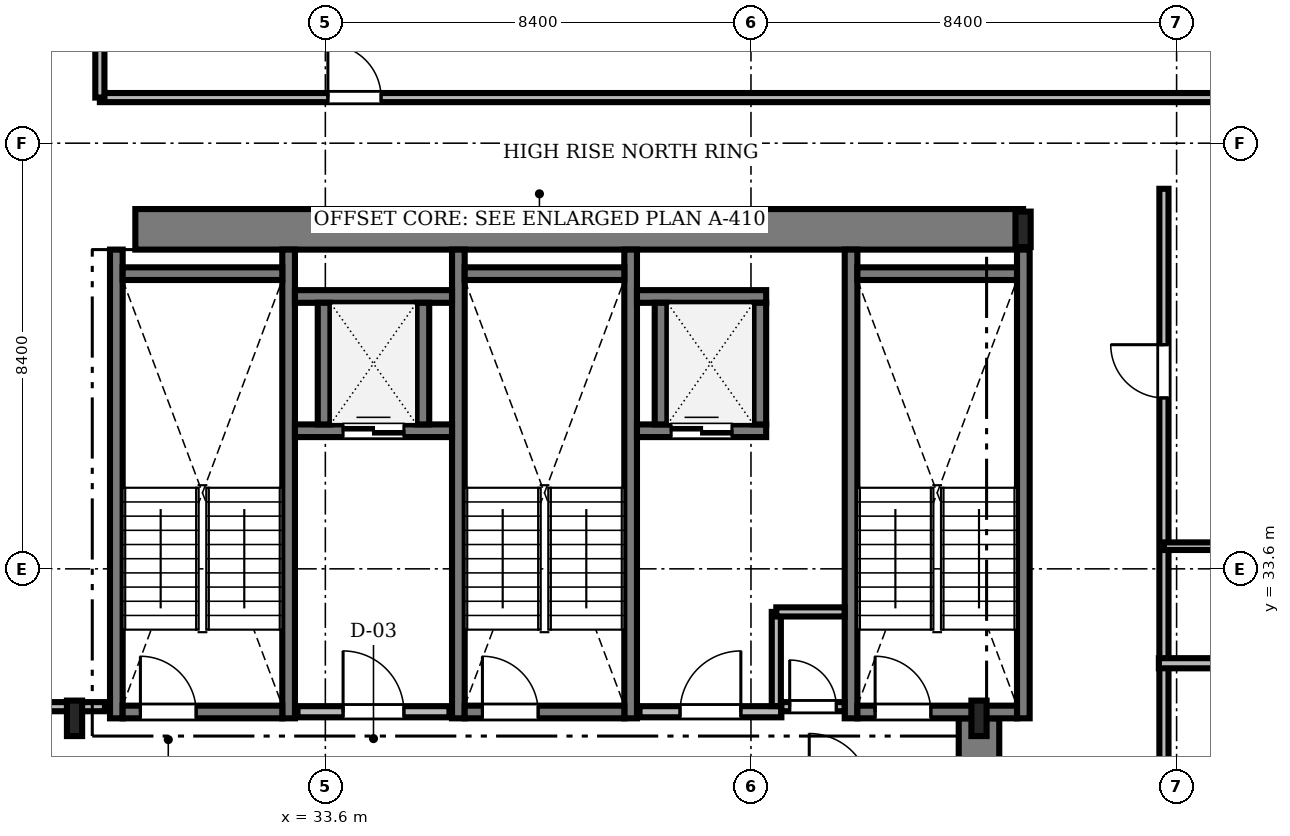
"""IFC4 building model, lengths in metres.
Left out: names, types, materials, properties, quantities, classifications, styles, units other than length and angle.
Written with IfcOpenShell. Run it as: python <this file> out.ifc"""

import sys

from ifc_helpers import new_model, si_unit, direction, frame, frame_2d, origin, origin_2d, place, context, subcontext, project, spatial, rectangle, i_section, extrude, source, transform, mapped, element, fill, save


model = new_model("IFC4")
c1 = context("Model", 3, precision=1e-05, world=origin(), true_north=direction((0.0, 1.0)))
c2 = subcontext(c1, "Body", "Model", "MODEL_VIEW")
j1 = project(units=[si_unit("LENGTHUNIT", "METRE"), si_unit("PLANEANGLEUNIT", "RADIAN")], contexts=[c1])
p1 = place(None, origin())
s1 = spatial("IfcSite", under=j1, at=p1, CompositionType="ELEMENT")
p2 = place(p1, origin())
s2 = spatial("IfcBuilding", under=s1, at=p2, CompositionType="ELEMENT")
p3 = place(p2, frame((0.0, 0.0, 207.3)))
s3 = spatial("IfcBuildingStorey", under=s2, at=p3, CompositionType="ELEMENT", Elevation=207.3)
m1 = source(origin(), c2, "Body", "SweptSolid", [
    extrude(rectangle(XDim=17.52, YDim=0.8, at=frame_2d((8.76, 0.0))), origin(), (0.0, 0.0, 1.0), 3.53),
])
p4 = place(p3, frame((29.85, 40.3, 0.0), z_axis=(0.0, 0.0, 1.0), x_axis=(1.0, 0.0, 0.0)))
e1 = element("IfcWall", 1, at=p4, inside=s3, PredefinedType="SHEAR", context=c2, shape_type="MappedRepresentation", body=[
    mapped(m1, transform((0.0, 0.0, 0.0), scale=1.0)),
])
m2 = source(origin(), c2, "Body", "SweptSolid", [
    extrude(rectangle(XDim=13.15, YDim=0.8, at=frame_2d((6.575, 0.0))), origin(), (0.0, 0.0, 1.0), 3.53),
])
p5 = place(p3, frame((46.5, 17.5, 0.0), z_axis=(0.0, 0.0, 1.0), x_axis=(0.0, 1.0, 0.0)))
e2 = element("IfcWall", 2, at=p5, inside=s3, PredefinedType="SHEAR", context=c2, shape_type="MappedRepresentation", body=[
    mapped(m2, transform((0.0, 0.0, 0.0), scale=1.0)),
])
m3 = source(origin(), c2, "Body", "SweptSolid", [
    extrude(i_section(OverallWidth=0.3, OverallDepth=0.7, WebThickness=0.017, FlangeThickness=0.032, FilletRadius=0.027, at=origin_2d()), origin(), (0.0, 0.0, 1.0), 3.53),
])
for number, where, z_axis, x_axis in (
    (3, (28.65, 30.65, 0.0), (0.0, 0.0, 1.0), (1.0, 0.0, 0.0)),
    (4, (46.5, 30.65, 0.0), (0.0, 0.0, 1.0), (1.0, 0.0, 0.0)),
    (5, (47.37, 40.3, 0.0), (0.0, 0.0, 1.0), (1.0, 0.0, 0.0)),
):
    element("IfcColumn", number, at=place(p3, frame(where, z_axis=z_axis, x_axis=x_axis)), inside=s3, PredefinedType="COLUMN", context=c2, shape_type="MappedRepresentation", body=[
        mapped(m3, transform((0.0, 0.0, 0.0), scale=1.0)),
    ])
m4 = source(origin(), c2, "Body", "SweptSolid", [
    extrude(rectangle(XDim=9.25, YDim=0.25, at=frame_2d((4.625, 0.0))), origin(), (0.0, 0.0, 1.0), 3.55),
])
for number, where, z_axis, x_axis in (
    (6, (29.475, 30.65, 0.0), (0.0, 0.0, 1.0), (0.0, 1.0, 0.0)),
    (7, (32.875, 30.65, 0.0), (0.0, 0.0, 1.0), (0.0, 1.0, 0.0)),
):
    element("IfcWall", number, at=place(p3, frame(where, z_axis=z_axis, x_axis=x_axis)), inside=s3, PredefinedType="SOLIDWALL", context=c2, shape_type="MappedRepresentation", body=[
        mapped(m4, transform((0.0, 0.0, 0.0), scale=1.0)),
    ])
m5 = source(origin(), c2, "Body", "SweptSolid", [
    extrude(rectangle(XDim=3.15, YDim=0.25, at=frame_2d((1.575, 0.0))), origin(), (0.0, 0.0, 1.0), 3.55),
])
p6 = place(p3, frame((29.6, 39.425, 0.0), z_axis=(0.0, 0.0, 1.0), x_axis=(1.0, 0.0, 0.0)))
e8 = element("IfcWall", 8, at=p6, inside=s3, PredefinedType="SOLIDWALL", context=c2, shape_type="MappedRepresentation", body=[
    mapped(m5, transform((0.0, 0.0, 0.0), scale=1.0)),
])
p7 = place(p3, frame((29.6, 30.775, 0.0), z_axis=(0.0, 0.0, 1.0), x_axis=(1.0, 0.0, 0.0)))
e9 = element("IfcWall", 9, at=p7, inside=s3, PredefinedType="SOLIDWALL", context=c2, shape_type="MappedRepresentation", body=[
    mapped(m5, transform((0.0, 0.0, 0.0), scale=1.0)),
])
m6 = source(origin(), c2, "Body", "SweptSolid", [
    extrude(rectangle(XDim=1.1, YDim=2.2, at=frame_2d((0.55, 1.1))), frame((0.0, 0.135, 0.0), z_axis=(0.0, -1.0, 0.0), x_axis=(1.0, 0.0, 0.0)), (0.0, 0.0, 1.0), 0.27),
])
p8 = place(p7, frame((0.35, 0.0, 0.0)))
e10 = element("IfcOpeningElement", 10, at=p8, cuts=e9, PredefinedType="OPENING", context=c2, shape_type="MappedRepresentation", body=[
    mapped(m6, transform((0.0, 0.0, 0.0), scale=1.0)),
])
for number, where, z_axis, x_axis in (
    (11, (36.225, 30.65, 0.0), (0.0, 0.0, 1.0), (0.0, 1.0, 0.0)),
    (12, (39.625, 30.65, 0.0), (0.0, 0.0, 1.0), (0.0, 1.0, 0.0)),
):
    element("IfcWall", number, at=place(p3, frame(where, z_axis=z_axis, x_axis=x_axis)), inside=s3, PredefinedType="SOLIDWALL", context=c2, shape_type="MappedRepresentation", body=[
        mapped(m4, transform((0.0, 0.0, 0.0), scale=1.0)),
    ])
p9 = place(p3, frame((36.35, 39.425, 0.0), z_axis=(0.0, 0.0, 1.0), x_axis=(1.0, 0.0, 0.0)))
e13 = element("IfcWall", 13, at=p9, inside=s3, PredefinedType="SOLIDWALL", context=c2, shape_type="MappedRepresentation", body=[
    mapped(m5, transform((0.0, 0.0, 0.0), scale=1.0)),
])
p10 = place(p3, frame((36.35, 30.775, 0.0), z_axis=(0.0, 0.0, 1.0), x_axis=(1.0, 0.0, 0.0)))
e14 = element("IfcWall", 14, at=p10, inside=s3, PredefinedType="SOLIDWALL", context=c2, shape_type="MappedRepresentation", body=[
    mapped(m5, transform((0.0, 0.0, 0.0), scale=1.0)),
])
p11 = place(p10, frame((0.35, 0.0, 0.0)))
e15 = element("IfcOpeningElement", 15, at=p11, cuts=e14, PredefinedType="OPENING", context=c2, shape_type="MappedRepresentation", body=[
    mapped(m6, transform((0.0, 0.0, 0.0), scale=1.0)),
])
for number, where, z_axis, x_axis in (
    (16, (43.975, 30.65, 0.0), (0.0, 0.0, 1.0), (0.0, 1.0, 0.0)),
    (17, (47.375, 30.65, 0.0), (0.0, 0.0, 1.0), (0.0, 1.0, 0.0)),
):
    element("IfcWall", number, at=place(p3, frame(where, z_axis=z_axis, x_axis=x_axis)), inside=s3, PredefinedType="SOLIDWALL", context=c2, shape_type="MappedRepresentation", body=[
        mapped(m4, transform((0.0, 0.0, 0.0), scale=1.0)),
    ])
p12 = place(p3, frame((44.1, 39.425, 0.0), z_axis=(0.0, 0.0, 1.0), x_axis=(1.0, 0.0, 0.0)))
e18 = element("IfcWall", 18, at=p12, inside=s3, PredefinedType="SOLIDWALL", context=c2, shape_type="MappedRepresentation", body=[
    mapped(m5, transform((0.0, 0.0, 0.0), scale=1.0)),
])
p13 = place(p3, frame((44.1, 30.775, 0.0), z_axis=(0.0, 0.0, 1.0), x_axis=(1.0, 0.0, 0.0)))
e19 = element("IfcWall", 19, at=p13, inside=s3, PredefinedType="SOLIDWALL", context=c2, shape_type="MappedRepresentation", body=[
    mapped(m5, transform((0.0, 0.0, 0.0), scale=1.0)),
])
p14 = place(p13, frame((0.35, 0.0, 0.0)))
e20 = element("IfcOpeningElement", 20, at=p14, cuts=e19, PredefinedType="OPENING", context=c2, shape_type="MappedRepresentation", body=[
    mapped(m6, transform((0.0, 0.0, 0.0), scale=1.0)),
])
m7 = source(origin(), c2, "Body", "SweptSolid", [
    extrude(rectangle(XDim=3.0, YDim=0.22, at=frame_2d((1.5, 0.0))), origin(), (0.0, 0.0, 1.0), 3.53),
])
p15 = place(p3, frame((33.05, 30.78, 0.0), z_axis=(0.0, 0.0, 1.0), x_axis=(1.0, 0.0, 0.0)))
e21 = element("IfcWall", 21, at=p15, inside=s3, PredefinedType="SOLIDWALL", context=c2, shape_type="MappedRepresentation", body=[
    mapped(m7, transform((0.0, 0.0, 0.0), scale=1.0)),
])
m8 = source(origin(), c2, "Body", "SweptSolid", [
    extrude(rectangle(XDim=1.2, YDim=2.2, at=frame_2d((0.6, 1.1))), frame((0.0, 0.12, 0.0), z_axis=(0.0, -1.0, 0.0), x_axis=(1.0, 0.0, 0.0)), (0.0, 0.0, 1.0), 0.24),
])
p16 = place(p15, frame((0.9, 0.0, 0.0)))
e22 = element("IfcOpeningElement", 22, at=p16, cuts=e21, PredefinedType="OPENING", context=c2, shape_type="MappedRepresentation", body=[
    mapped(m8, transform((0.0, 0.0, 0.0), scale=1.0)),
])
m9 = source(origin(), c2, "Body", "SweptSolid", [
    extrude(rectangle(XDim=2.8, YDim=0.22, at=frame_2d((1.4, 0.0))), origin(), (0.0, 0.0, 1.0), 3.53),
])
p17 = place(p3, frame((39.8, 30.78, 0.0), z_axis=(0.0, 0.0, 1.0), x_axis=(1.0, 0.0, 0.0)))
e23 = element("IfcWall", 23, at=p17, inside=s3, PredefinedType="SOLIDWALL", context=c2, shape_type="MappedRepresentation", body=[
    mapped(m9, transform((0.0, 0.0, 0.0), scale=1.0)),
])
p18 = place(p17, frame((0.8, 0.0, 0.0)))
e24 = element("IfcOpeningElement", 24, at=p18, cuts=e23, PredefinedType="OPENING", context=c2, shape_type="MappedRepresentation", body=[
    mapped(m8, transform((0.0, 0.0, 0.0), scale=1.0)),
])
m10 = source(origin(), c2, "Body", "SweptSolid", [
    extrude(rectangle(XDim=3.1, YDim=0.25, at=frame_2d((1.55, 0.0))), origin(), (0.0, 0.0, 1.0), 3.53),
])
p19 = place(p3, frame((33.0, 36.325, 0.0), z_axis=(0.0, 0.0, 1.0), x_axis=(1.0, 0.0, 0.0)))
e25 = element("IfcWall", 25, at=p19, inside=s3, PredefinedType="SOLIDWALL", context=c2, shape_type="MappedRepresentation", body=[
    mapped(m10, transform((0.0, 0.0, 0.0), scale=1.0)),
])
m11 = source(origin(), c2, "Body", "SweptSolid", [
    extrude(rectangle(XDim=1.2, YDim=2.25, at=frame_2d((0.6, 1.125))), frame((0.0, 0.135, 0.0), z_axis=(0.0, -1.0, 0.0), x_axis=(1.0, 0.0, 0.0)), (0.0, 0.0, 1.0), 0.27),
])
p20 = place(p19, frame((0.95, 0.0, 0.0)))
e26 = element("IfcOpeningElement", 26, at=p20, cuts=e25, PredefinedType="OPENING", context=c2, shape_type="MappedRepresentation", body=[
    mapped(m11, transform((0.0, 0.0, 0.0), scale=1.0)),
])
p21 = place(p3, frame((33.0, 38.975, 0.0), z_axis=(0.0, 0.0, 1.0), x_axis=(1.0, 0.0, 0.0)))
e27 = element("IfcWall", 27, at=p21, inside=s3, PredefinedType="SOLIDWALL", context=c2, shape_type="MappedRepresentation", body=[
    mapped(m10, transform((0.0, 0.0, 0.0), scale=1.0)),
])
m12 = source(origin(), c2, "Body", "SweptSolid", [
    extrude(rectangle(XDim=2.4, YDim=0.25, at=frame_2d((1.2, 0.0))), origin(), (0.0, 0.0, 1.0), 3.53),
])
for number, where, z_axis, x_axis in (
    (28, (33.575, 36.45, 0.0), (0.0, 0.0, 1.0), (0.0, 1.0, 0.0)),
    (29, (35.525, 36.45, 0.0), (0.0, 0.0, 1.0), (0.0, 1.0, 0.0)),
):
    element("IfcWall", number, at=place(p3, frame(where, z_axis=z_axis, x_axis=x_axis)), inside=s3, PredefinedType="SOLIDWALL", context=c2, shape_type="MappedRepresentation", body=[
        mapped(m12, transform((0.0, 0.0, 0.0), scale=1.0)),
    ])
m13 = source(origin(), c2, "Body", "SweptSolid", [
    extrude(rectangle(XDim=2.55, YDim=0.25, at=frame_2d((1.275, 0.0))), origin(), (0.0, 0.0, 1.0), 3.53),
])
p22 = place(p3, frame((39.75, 36.325, 0.0), z_axis=(0.0, 0.0, 1.0), x_axis=(1.0, 0.0, 0.0)))
e30 = element("IfcWall", 30, at=p22, inside=s3, PredefinedType="SOLIDWALL", context=c2, shape_type="MappedRepresentation", body=[
    mapped(m13, transform((0.0, 0.0, 0.0), scale=1.0)),
])
p23 = place(p22, frame((0.675, 0.0, 0.0)))
e31 = element("IfcOpeningElement", 31, at=p23, cuts=e30, PredefinedType="OPENING", context=c2, shape_type="MappedRepresentation", body=[
    mapped(m11, transform((0.0, 0.0, 0.0), scale=1.0)),
])
p24 = place(p3, frame((39.75, 38.975, 0.0), z_axis=(0.0, 0.0, 1.0), x_axis=(1.0, 0.0, 0.0)))
e32 = element("IfcWall", 32, at=p24, inside=s3, PredefinedType="SOLIDWALL", context=c2, shape_type="MappedRepresentation", body=[
    mapped(m13, transform((0.0, 0.0, 0.0), scale=1.0)),
])
for number, where, z_axis, x_axis in (
    (33, (40.225, 36.45, 0.0), (0.0, 0.0, 1.0), (0.0, 1.0, 0.0)),
    (34, (42.175, 36.45, 0.0), (0.0, 0.0, 1.0), (0.0, 1.0, 0.0)),
):
    element("IfcWall", number, at=place(p3, frame(where, z_axis=z_axis, x_axis=x_axis)), inside=s3, PredefinedType="SOLIDWALL", context=c2, shape_type="MappedRepresentation", body=[
        mapped(m12, transform((0.0, 0.0, 0.0), scale=1.0)),
    ])
m14 = source(origin(), c2, "Body", "SweptSolid", [
    extrude(rectangle(XDim=28.428, YDim=0.18, at=frame_2d((14.214, 0.0))), origin(), (0.0, 0.0, 1.0), 2.772),
])
p25 = place(p3, frame((29.15, 42.9, 0.0), z_axis=(0.0, 0.0, 1.0), x_axis=(1.0, 0.0, 0.0)))
e35 = element("IfcWall", 35, at=p25, inside=s3, PredefinedType="PARTITIONING", context=c2, shape_type="MappedRepresentation", body=[
    mapped(m14, transform((0.0, 0.0, 0.0), scale=1.0)),
])
m15 = source(origin(), c2, "Body", "SweptSolid", [
    extrude(rectangle(XDim=1.05, YDim=2.2, at=frame_2d((0.525, 1.1))), frame((0.0, 0.1, 0.0), z_axis=(0.0, -1.0, 0.0), x_axis=(1.0, 0.0, 0.0)), (0.0, 0.0, 1.0), 0.2),
])
p26 = place(p25, frame((4.5, 0.0, 0.0)))
e36 = element("IfcOpeningElement", 36, at=p26, cuts=e35, PredefinedType="OPENING", context=c2, shape_type="MappedRepresentation", body=[
    mapped(m15, transform((0.0, 0.0, 0.0), scale=1.0)),
])
m16 = source(origin(), c2, "Body", "SweptSolid", [
    extrude(rectangle(XDim=27.65, YDim=0.18, at=frame_2d((13.825, 0.0))), origin(), (0.0, 0.0, 1.0), 2.972),
])
p27 = place(p3, frame((50.15, 13.45, 0.0), z_axis=(0.0, 0.0, 1.0), x_axis=(0.0, 1.0, 0.0)))
e37 = element("IfcWall", 37, at=p27, inside=s3, PredefinedType="PARTITIONING", context=c2, shape_type="MappedRepresentation", body=[
    mapped(m16, transform((0.0, 0.0, 0.0), scale=1.0)),
])
p28 = place(p27, frame((5.237, 0.0, 0.0)))
e38 = element("IfcOpeningElement", 38, at=p28, cuts=e37, PredefinedType="OPENING", context=c2, shape_type="MappedRepresentation", body=[
    mapped(m15, transform((0.0, 0.0, 0.0), scale=1.0)),
])
p29 = place(p27, frame((14.38, 0.0, 0.0)))
e39 = element("IfcOpeningElement", 39, at=p29, cuts=e37, PredefinedType="OPENING", context=c2, shape_type="MappedRepresentation", body=[
    mapped(m15, transform((0.0, 0.0, 0.0), scale=1.0)),
])
p30 = place(p27, frame((23.523, 0.0, 0.0)))
e40 = element("IfcOpeningElement", 40, at=p30, cuts=e37, PredefinedType="OPENING", context=c2, shape_type="MappedRepresentation", body=[
    mapped(m15, transform((0.0, 0.0, 0.0), scale=1.0)),
])
m17 = source(origin(), c2, "Body", "SweptSolid", [
    extrude(rectangle(XDim=17.828, YDim=0.18, at=frame_2d((8.914, 0.0))), origin(), (0.0, 0.0, 1.0), 2.772),
])
p31 = place(p3, frame((11.422, 30.88, 0.0), z_axis=(0.0, 0.0, 1.0), x_axis=(1.0, 0.0, 0.0)))
e41 = element("IfcWall", 41, at=p31, inside=s3, PredefinedType="PARTITIONING", context=c2, shape_type="MappedRepresentation", body=[
    mapped(m17, transform((0.0, 0.0, 0.0), scale=1.0)),
])
p32 = place(p31, frame((10.778, 0.0, 0.0)))
e42 = element("IfcOpeningElement", 42, at=p32, cuts=e41, PredefinedType="OPENING", context=c2, shape_type="MappedRepresentation", body=[
    mapped(m15, transform((0.0, 0.0, 0.0), scale=1.0)),
])
m18 = source(origin(), c2, "Body", "SweptSolid", [
    extrude(rectangle(XDim=1.248, YDim=0.18, at=frame_2d((0.624, 0.0))), origin(), (0.0, 0.0, 1.0), 3.53),
])
p33 = place(p3, frame((42.6, 30.88, 0.0), z_axis=(0.0, 0.0, 1.0), x_axis=(1.0, 0.0, 0.0)))
e43 = element("IfcWall", 43, at=p33, inside=s3, PredefinedType="PARTITIONING", context=c2, shape_type="MappedRepresentation", body=[
    mapped(m18, transform((0.0, 0.0, 0.0), scale=1.0)),
])
m19 = source(origin(), c2, "Body", "SweptSolid", [
    extrude(rectangle(XDim=0.92, YDim=2.1, at=frame_2d((0.46, 1.05))), frame((0.0, 0.1, 0.0), z_axis=(0.0, -1.0, 0.0), x_axis=(1.0, 0.0, 0.0)), (0.0, 0.0, 1.0), 0.2),
])
p34 = place(p33, frame((0.164, 0.0, 0.0)))
e44 = element("IfcOpeningElement", 44, at=p34, cuts=e43, PredefinedType="OPENING", context=c2, shape_type="MappedRepresentation", body=[
    mapped(m19, transform((0.0, 0.0, 0.0), scale=1.0)),
])
m20 = source(origin(), c2, "Body", "SweptSolid", [
    extrude(rectangle(XDim=7.528, YDim=0.2, at=frame_2d((3.764, 0.0))), origin(), (0.0, 0.0, 1.0), 2.772),
])
p35 = place(p3, frame((50.05, 31.737, 0.0), z_axis=(0.0, 0.0, 1.0), x_axis=(1.0, 0.0, 0.0)))
e45 = element("IfcWall", 45, at=p35, inside=s3, PredefinedType="PARTITIONING", context=c2, shape_type="MappedRepresentation", body=[
    mapped(m20, transform((0.0, 0.0, 0.0), scale=1.0)),
])
m21 = source(origin(), c2, "Body", "SweptSolid", [
    extrude(rectangle(XDim=5.378, YDim=0.18, at=frame_2d((2.689, 0.0))), origin(), (0.0, 0.0, 1.0), 2.772),
])
p36 = place(p3, frame((29.15, 42.9, 0.0), z_axis=(0.0, 0.0, 1.0), x_axis=(0.0, 1.0, 0.0)))
e46 = element("IfcWall", 46, at=p36, inside=s3, PredefinedType="PARTITIONING", context=c2, shape_type="MappedRepresentation", body=[
    mapped(m21, transform((0.0, 0.0, 0.0), scale=1.0)),
])
m22 = source(origin(), c2, "Body", "SweptSolid", [
    extrude(rectangle(XDim=2.36, YDim=0.15, at=frame_2d((1.18, 0.0))), origin(), (0.0, 0.0, 1.0), 3.53),
])
p37 = place(p3, frame((50.15, 34.047, 0.0), z_axis=(0.0, 0.0, 1.0), x_axis=(1.0, 0.0, 0.0)))
e47 = element("IfcWall", 47, at=p37, inside=s3, PredefinedType="PARTITIONING", context=c2, shape_type="MappedRepresentation", body=[
    mapped(m22, transform((0.0, 0.0, 0.0), scale=1.0)),
])
m23 = source(origin(), c2, "Body", "SweptSolid", [
    extrude(rectangle(XDim=1.858, YDim=0.18, at=frame_2d((0.929, 0.0))), origin(), (0.0, 0.0, 1.0), 3.53),
])
p38 = place(p3, frame((42.5, 30.892, 0.0), z_axis=(0.0, 0.0, 1.0), x_axis=(0.0, 1.0, 0.0)))
e48 = element("IfcWall", 48, at=p38, inside=s3, PredefinedType="PARTITIONING", context=c2, shape_type="MappedRepresentation", body=[
    mapped(m23, transform((0.0, 0.0, 0.0), scale=1.0)),
])
m24 = source(origin(), c2, "Body", "SweptSolid", [
    extrude(rectangle(XDim=1.348, YDim=0.18, at=frame_2d((0.674, 0.0))), origin(), (0.0, 0.0, 1.0), 3.53),
])
p39 = place(p3, frame((42.5, 32.75, 0.0), z_axis=(0.0, 0.0, 1.0), x_axis=(1.0, 0.0, 0.0)))
e49 = element("IfcWall", 49, at=p39, inside=s3, PredefinedType="PARTITIONING", context=c2, shape_type="MappedRepresentation", body=[
    mapped(m24, transform((0.0, 0.0, 0.0), scale=1.0)),
])
m25 = source(origin(), c2, "Body", "SweptSolid", [
    extrude(rectangle(XDim=1.1, YDim=2.2, at=frame_2d((0.55, 1.1))), frame((0.0, 0.025, 0.0), z_axis=(0.0, -1.0, 0.0), x_axis=(1.0, 0.0, 0.0)), (0.0, 0.0, 1.0), 0.05),
])
p40 = place(p8, origin())
e50 = element("IfcDoor", 50, at=p40, inside=s3, OperationType="SINGLE_SWING_LEFT", PredefinedType="DOOR", context=c2, shape_type="MappedRepresentation", body=[
    mapped(m25, transform((0.0, 0.0, 0.0), scale=1.0)),
])
fill(e10, e50)
p41 = place(p11, origin())
e51 = element("IfcDoor", 51, at=p41, inside=s3, OperationType="SINGLE_SWING_LEFT", PredefinedType="DOOR", context=c2, shape_type="MappedRepresentation", body=[
    mapped(m25, transform((0.0, 0.0, 0.0), scale=1.0)),
])
fill(e15, e51)
p42 = place(p14, origin())
e52 = element("IfcDoor", 52, at=p42, inside=s3, OperationType="SINGLE_SWING_LEFT", PredefinedType="DOOR", context=c2, shape_type="MappedRepresentation", body=[
    mapped(m25, transform((0.0, 0.0, 0.0), scale=1.0)),
])
fill(e20, e52)
m26 = source(origin(), c2, "Body", "SweptSolid", [
    extrude(rectangle(XDim=1.2, YDim=2.2, at=frame_2d((0.6, 1.1))), frame((0.0, 0.025, 0.0), z_axis=(0.0, -1.0, 0.0), x_axis=(1.0, 0.0, 0.0)), (0.0, 0.0, 1.0), 0.05),
])
p43 = place(p16, origin())
e53 = element("IfcDoor", 53, at=p43, inside=s3, OperationType="SINGLE_SWING_LEFT", PredefinedType="DOOR", context=c2, shape_type="MappedRepresentation", body=[
    mapped(m26, transform((0.0, 0.0, 0.0), scale=1.0)),
])
fill(e22, e53)
p44 = place(p18, origin())
e54 = element("IfcDoor", 54, at=p44, inside=s3, OperationType="SINGLE_SWING_RIGHT", PredefinedType="DOOR", context=c2, shape_type="MappedRepresentation", body=[
    mapped(m26, transform((0.0, 0.0, 0.0), scale=1.0)),
])
fill(e24, e54)
m27 = source(origin(), c2, "Body", "SweptSolid", [
    extrude(rectangle(XDim=1.2, YDim=2.25, at=frame_2d((0.6, 1.125))), frame((0.0, 0.025, 0.0), z_axis=(0.0, -1.0, 0.0), x_axis=(1.0, 0.0, 0.0)), (0.0, 0.0, 1.0), 0.05),
])
p45 = place(p20, origin())
e55 = element("IfcDoor", 55, at=p45, inside=s3, OperationType="DOUBLE_DOOR_SLIDING", PredefinedType="DOOR", context=c2, shape_type="MappedRepresentation", body=[
    mapped(m27, transform((0.0, 0.0, 0.0), scale=1.0)),
])
fill(e26, e55)
p46 = place(p23, origin())
e56 = element("IfcDoor", 56, at=p46, inside=s3, OperationType="DOUBLE_DOOR_SLIDING", PredefinedType="DOOR", context=c2, shape_type="MappedRepresentation", body=[
    mapped(m27, transform((0.0, 0.0, 0.0), scale=1.0)),
])
fill(e31, e56)
m28 = source(origin(), c2, "Body", "SweptSolid", [
    extrude(rectangle(XDim=1.05, YDim=2.2, at=frame_2d((0.525, 1.1))), frame((0.0, 0.025, 0.0), z_axis=(0.0, -1.0, 0.0), x_axis=(1.0, 0.0, 0.0)), (0.0, 0.0, 1.0), 0.05),
])
p47 = place(p26, origin())
e57 = element("IfcDoor", 57, at=p47, inside=s3, OperationType="SINGLE_SWING_LEFT", PredefinedType="DOOR", context=c2, shape_type="MappedRepresentation", body=[
    mapped(m28, transform((0.0, 0.0, 0.0), scale=1.0)),
])
fill(e36, e57)
p48 = place(p30, origin())
e58 = element("IfcDoor", 58, at=p48, inside=s3, OperationType="SINGLE_SWING_RIGHT", PredefinedType="DOOR", context=c2, shape_type="MappedRepresentation", body=[
    mapped(m28, transform((0.0, 0.0, 0.0), scale=1.0)),
])
fill(e40, e58)
m29 = source(origin(), c2, "Body", "SweptSolid", [
    extrude(rectangle(XDim=0.92, YDim=2.1, at=frame_2d((0.46, 1.05))), frame((0.0, 0.025, 0.0), z_axis=(0.0, -1.0, 0.0), x_axis=(1.0, 0.0, 0.0)), (0.0, 0.0, 1.0), 0.05),
])
p49 = place(p34, origin())
e59 = element("IfcDoor", 59, at=p49, inside=s3, OperationType="SINGLE_SWING_LEFT", PredefinedType="DOOR", context=c2, shape_type="MappedRepresentation", body=[
    mapped(m29, transform((0.0, 0.0, 0.0), scale=1.0)),
])
fill(e44, e59)
save(model, sys.argv[1])
